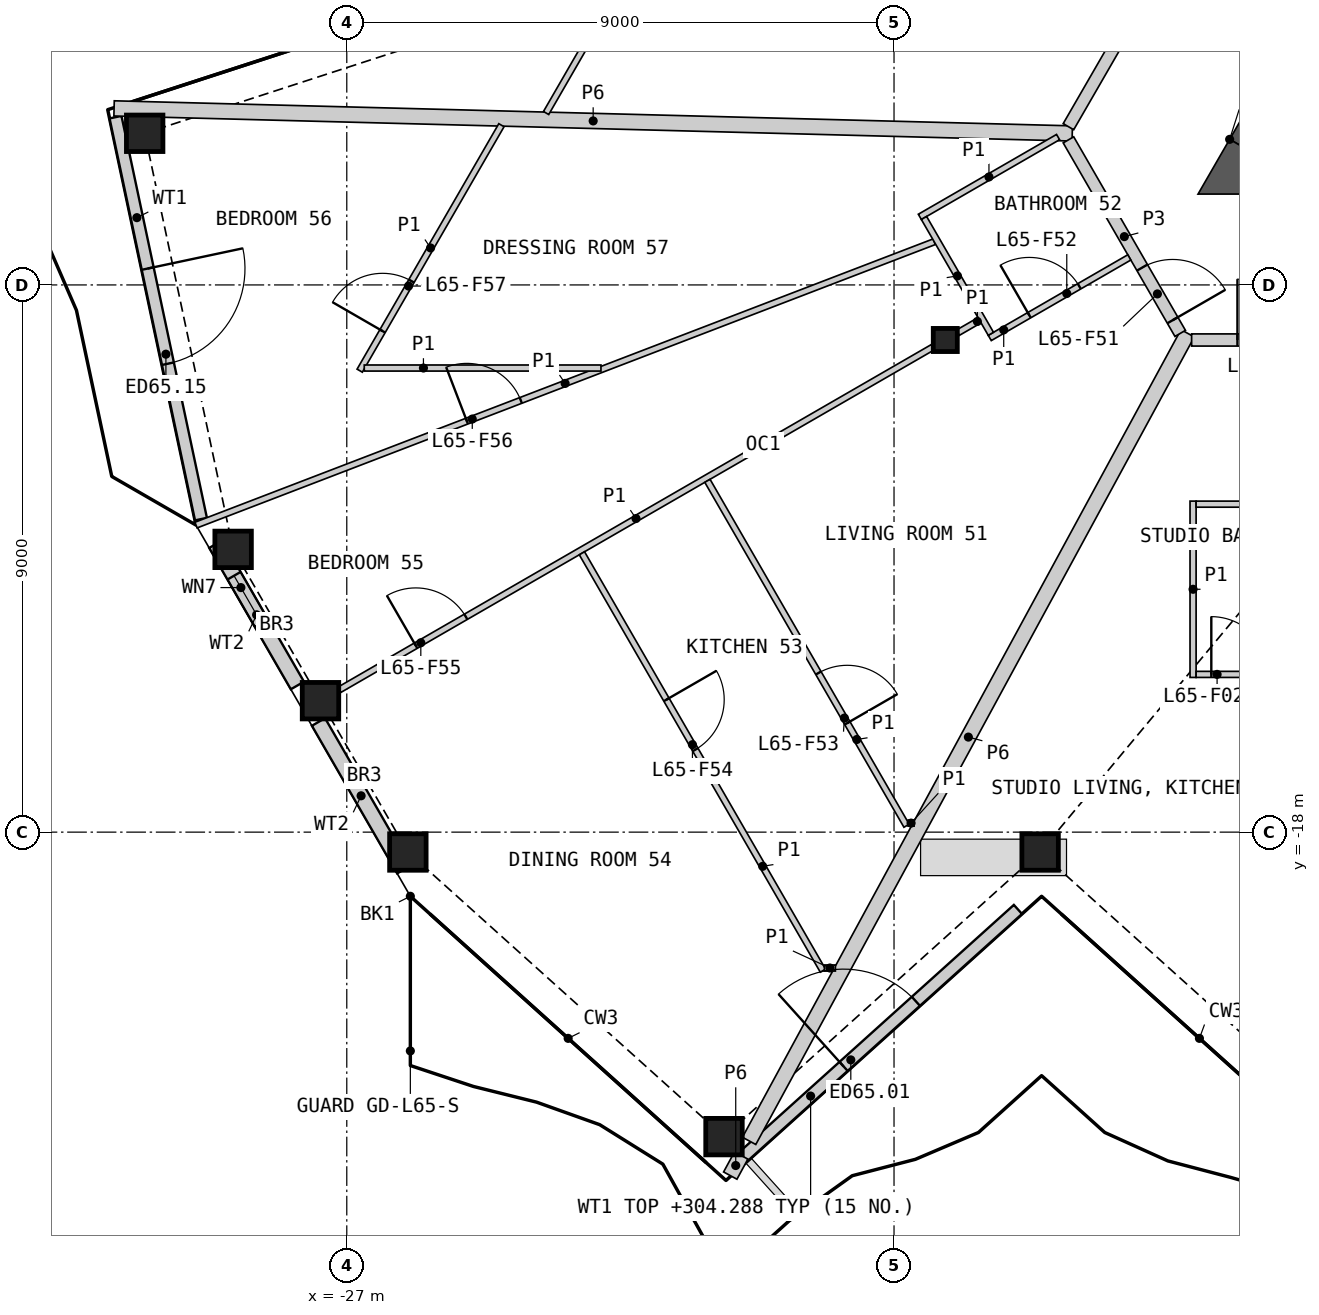
"""IFC4 building model, lengths in metres.
Left out: names, types, materials, properties, quantities, classifications, styles, units other than length and angle.
Written with IfcOpenShell. Run it as: python <this file> out.ifc"""

import sys

from ifc_helpers import new_model, si_unit, direction, frame, frame_2d, origin, origin_2d, place, context, subcontext, project, spatial, polyline, rectangle, hollow_rectangle, i_section, outline, extrude, element, fill, save


model = new_model("IFC4")
c1 = context("Model", 3, precision=1e-05, world=origin(), true_north=direction((0.0, 1.0)))
c2 = subcontext(c1, "Body", "Model", "MODEL_VIEW")
j1 = project(units=[si_unit("LENGTHUNIT", "METRE"), si_unit("PLANEANGLEUNIT", "RADIAN")], contexts=[c1])
p1 = place(None, origin())
s1 = spatial("IfcSite", under=j1, at=p1, CompositionType="ELEMENT")
p2 = place(p1, origin())
s2 = spatial("IfcBuilding", under=s1, at=p2, CompositionType="ELEMENT")
p3 = place(p2, frame((0.0, 0.0, 301.8)))
s3 = spatial("IfcBuildingStorey", under=s2, at=p3, CompositionType="ELEMENT", Elevation=301.8)
for number, where, z_axis, x_axis in (
    (1, (-25.995, -18.327, 0.0), (0.0, 0.0, 1.0), (1.0, 0.0, 0.0)),
    (2, (-20.796, -23.008, 0.0), (0.0, 0.0, 1.0), (1.0, 0.0, 0.0)),
    (3, (-15.597, -18.327, 0.0), (0.0, 0.0, 1.0), (1.0, 0.0, 0.0)),
    (4, (-30.324, -6.506, 0.0), (0.0, 0.0, 1.0), (1.0, 0.0, 0.0)),
    (5, (-28.869, -13.349, 0.0), (0.0, 0.0, 1.0), (1.0, 0.0, 0.0)),
    (6, (-27.432, -15.838, 0.0), (0.0, 0.0, 1.0), (1.0, 0.0, 0.0)),
):
    element("IfcColumn", number, at=place(p3, frame(where, z_axis=z_axis, x_axis=x_axis)), inside=s3, PredefinedType="COLUMN", context=c2, shape_type="SweptSolid", body=[
        extrude(hollow_rectangle(XDim=0.6, YDim=0.6, WallThickness=0.04, at=origin_2d()), origin(), (0.0, 0.0, 1.0), 3.4),
    ])
p4 = place(p3, frame((-17.157, -9.906, 0.0), z_axis=(0.0, 0.0, 1.0), x_axis=(1.0, 0.0, 0.0)))
e7 = element("IfcColumn", 7, at=p4, inside=s3, PredefinedType="COLUMN", context=c2, shape_type="SweptSolid", body=[
    extrude(i_section(OverallWidth=0.396, OverallDepth=0.381, WebThickness=0.019, FlangeThickness=0.03, at=origin_2d()), origin(), (0.0, 0.0, 1.0), 3.4),
])
p5 = place(p3, frame((-20.508, -23.364, 0.0), z_axis=(0.0, 0.0, 1.0), x_axis=(0.743135364919, 0.669141113224, 0.0)))
e8 = element("IfcWall", 8, at=p5, inside=s3, PredefinedType="SOLIDWALL", context=c2, shape_type="SweptSolid", body=[
    extrude(rectangle(XDim=6.117, YDim=0.2, at=frame_2d((3.059, 0.0))), origin(), (0.0, 0.0, 1.0), 2.488),
])
p6 = place(p5, frame((2.259, 0.0, 0.0)))
e9 = element("IfcOpeningElement", 9, at=p6, cuts=e8, PredefinedType="OPENING", context=c2, shape_type="SweptSolid", body=[
    extrude(rectangle(XDim=1.6, YDim=2.25, at=frame_2d((0.8, 1.125))), frame((0.0, 0.11, 0.0), z_axis=(0.0, -1.0, 0.0), x_axis=(1.0, 0.0, 0.0)), (0.0, 0.0, 1.0), 0.22),
])
p7 = place(p3, frame((-30.803, -6.241, 0.0), z_axis=(0.0, 0.0, 1.0), x_axis=(0.207917941651, -0.978146272057, 0.0)))
e10 = element("IfcWall", 10, at=p7, inside=s3, PredefinedType="SOLIDWALL", context=c2, shape_type="SweptSolid", body=[
    extrude(rectangle(XDim=6.759, YDim=0.2, at=frame_2d((3.379, 0.0))), origin(), (0.0, 0.0, 1.0), 2.488),
])
p8 = place(p7, frame((2.545, 0.0, 0.0)))
e11 = element("IfcOpeningElement", 11, at=p8, cuts=e10, PredefinedType="OPENING", context=c2, shape_type="SweptSolid", body=[
    extrude(rectangle(XDim=1.6, YDim=2.25, at=frame_2d((0.8, 1.125))), frame((0.0, 0.11, 0.0), z_axis=(0.0, -1.0, 0.0), x_axis=(1.0, 0.0, 0.0)), (0.0, 0.0, 1.0), 0.22),
])
p9 = place(p3, frame((-29.154, -13.263, 0.0), z_axis=(0.0, 0.0, 1.0), x_axis=(0.500032109083, -0.866006864803, 0.0)))
e12 = element("IfcWall", 12, at=p9, inside=s3, PredefinedType="SOLIDWALL", context=c2, shape_type="SweptSolid", body=[
    extrude(rectangle(XDim=2.684, YDim=0.25, at=frame_2d((1.342, 0.0))), origin(), (0.0, 0.0, 1.0), 2.488),
])
p10 = place(p9, frame((0.6, 0.0, 0.4)))
e13 = element("IfcOpeningElement", 13, at=p10, cuts=e12, PredefinedType="OPENING", context=c2, shape_type="SweptSolid", body=[
    extrude(rectangle(XDim=0.9, YDim=0.6, at=frame_2d((0.45, 0.3))), frame((0.0, 0.135, 0.0), z_axis=(0.0, -1.0, 0.0), x_axis=(1.0, 0.0, 0.0)), (0.0, 0.0, 1.0), 0.27),
])
p11 = place(p3, frame((-27.466, -16.188, 0.0), z_axis=(0.0, 0.0, 1.0), x_axis=(0.499968627931, -0.866043515699, 0.0)))
e14 = element("IfcWall", 14, at=p11, inside=s3, PredefinedType="SOLIDWALL", context=c2, shape_type="SweptSolid", body=[
    extrude(rectangle(XDim=2.804, YDim=0.25, at=frame_2d((1.402, 0.0))), origin(), (0.0, 0.0, 1.0), 2.488),
])
p12 = place(p3, frame((-9.562, -2.15, 0.0), z_axis=(0.0, 0.0, 1.0), x_axis=(-0.500015214976, -0.866016619236, 0.0)))
e15 = element("IfcWall", 15, at=p12, inside=s3, PredefinedType="SHEAR", context=c2, shape_type="SweptSolid", body=[
    extrude(rectangle(XDim=5.318, YDim=0.6, at=frame_2d((2.659, 0.0))), origin(), (0.0, 0.0, 1.0), 3.1),
])
p13 = place(p3, origin())
e16 = element("IfcWall", 16, at=p13, inside=s3, PredefinedType="SHEAR", context=c2, shape_type="SweptSolid", body=[
    extrude(outline(polyline([(-12.48, -6.606), (-11.961, -6.906), (-11.961, -7.506), (-13.0, -7.506), (-12.48, -6.606)])), origin(), (0.0, 0.0, 1.0), 3.1),
])
p14 = place(p3, frame((-30.827, -6.096, 0.0), z_axis=(0.0, 0.0, 1.0), x_axis=(0.999657799118, -0.026158835273, 0.0)))
e17 = element("IfcWall", 17, at=p14, inside=s3, PredefinedType="PARTITIONING", context=c2, shape_type="SweptSolid", body=[
    extrude(rectangle(XDim=15.763, YDim=0.25, at=frame_2d((7.882, 0.0))), origin(), (0.0, 0.0, 1.0), 2.33),
])
p15 = place(p3, frame((-20.383, -23.078, 0.0), z_axis=(0.0, 0.0, 1.0), x_axis=(0.477177412766, 0.878806984921, 0.0)))
e18 = element("IfcWall", 18, at=p15, inside=s3, PredefinedType="PARTITIONING", context=c2, shape_type="SweptSolid", body=[
    extrude(rectangle(XDim=15.114, YDim=0.25, at=frame_2d((7.557, 0.0))), origin(), (0.0, 0.0, 1.0), 2.33),
])
p16 = place(p3, frame((-13.106, -9.906, 0.0), z_axis=(0.0, 0.0, 1.0), x_axis=(1.0, 0.0, 0.0)))
e19 = element("IfcWall", 19, at=p16, inside=s3, PredefinedType="PARTITIONING", context=c2, shape_type="SweptSolid", body=[
    extrude(rectangle(XDim=4.32, YDim=0.2, at=frame_2d((2.16, 0.0))), origin(), (0.0, 0.0, 1.0), 3.1),
])
p17 = place(p16, frame((0.753, 0.0, 0.0)))
e20 = element("IfcOpeningElement", 20, at=p17, cuts=e19, PredefinedType="OPENING", context=c2, shape_type="SweptSolid", body=[
    extrude(rectangle(XDim=1.0, YDim=2.1, at=frame_2d((0.5, 1.05))), frame((0.0, 0.11, 0.0), z_axis=(0.0, -1.0, 0.0), x_axis=(1.0, 0.0, 0.0)), (0.0, 0.0, 1.0), 0.22),
])
p18 = place(p3, frame((-15.131, -6.397, 0.0), z_axis=(0.0, 0.0, 1.0), x_axis=(0.500003406062, 0.866023437285, 0.0)))
e21 = element("IfcWall", 21, at=p18, inside=s3, PredefinedType="PARTITIONING", context=c2, shape_type="SweptSolid", body=[
    extrude(rectangle(XDim=4.288, YDim=0.2, at=frame_2d((2.144, 0.0))), origin(), (0.0, 0.0, 1.0), 3.1),
])
p19 = place(p3, frame((-15.131, -6.614, 0.0), z_axis=(0.0, 0.0, 1.0), x_axis=(0.499967746641, -0.866044024469, 0.0)))
e22 = element("IfcWall", 22, at=p19, inside=s3, PredefinedType="PARTITIONING", context=c2, shape_type="SweptSolid", body=[
    extrude(rectangle(XDim=3.676, YDim=0.2, at=frame_2d((1.838, 0.0))), origin(), (0.0, 0.0, 1.0), 3.1),
])
p20 = place(p19, frame((2.426, 0.0, 0.0)))
e23 = element("IfcOpeningElement", 23, at=p20, cuts=e22, PredefinedType="OPENING", context=c2, shape_type="SweptSolid", body=[
    extrude(rectangle(XDim=1.0, YDim=2.1, at=frame_2d((0.5, 1.05))), frame((0.0, 0.11, 0.0), z_axis=(0.0, -1.0, 0.0), x_axis=(1.0, 0.0, 0.0)), (0.0, 0.0, 1.0), 0.22),
])
p21 = place(p3, frame((-20.693, -23.649, 0.0), z_axis=(0.0, 0.0, 1.0), x_axis=(0.477077538769, 0.878861207474, 0.0)))
e24 = element("IfcWall", 24, at=p21, inside=s3, PredefinedType="PARTITIONING", context=c2, shape_type="SweptSolid", body=[
    extrude(rectangle(XDim=0.376, YDim=0.25, at=frame_2d((0.188, 0.0))), origin(), (0.0, 0.0, 1.0), 2.33),
])
p22 = place(p3, frame((-29.479, -12.95, 0.0), z_axis=(0.0, 0.0, 1.0), x_axis=(0.933581523131, 0.358365092703, 0.0)))
e25 = element("IfcWall", 25, at=p22, inside=s3, PredefinedType="PARTITIONING", context=c2, shape_type="SweptSolid", body=[
    extrude(rectangle(XDim=13.005, YDim=0.1, at=frame_2d((6.502, 0.0))), origin(), (0.0, 0.0, 1.0), 2.33),
])
p23 = place(p22, frame((4.771, 0.0, 0.0)))
e26 = element("IfcOpeningElement", 26, at=p23, cuts=e25, PredefinedType="OPENING", context=c2, shape_type="SweptSolid", body=[
    extrude(rectangle(XDim=0.95, YDim=2.1, at=frame_2d((0.475, 1.05))), frame((0.0, 0.06, 0.0), z_axis=(0.0, -1.0, 0.0), x_axis=(1.0, 0.0, 0.0)), (0.0, 0.0, 1.0), 0.12),
])
p24 = place(p3, frame((-27.122, -15.659, 0.0), z_axis=(0.0, 0.0, 1.0), x_axis=(0.866021046153, 0.500007547564, 0.0)))
e27 = element("IfcWall", 27, at=p24, inside=s3, PredefinedType="PARTITIONING", context=c2, shape_type="SweptSolid", body=[
    extrude(rectangle(XDim=11.267, YDim=0.1, at=frame_2d((5.634, 0.0))), origin(), (0.0, 0.0, 1.0), 2.33),
])
p25 = place(p24, frame((1.452, 0.0, 0.0)))
e28 = element("IfcOpeningElement", 28, at=p25, cuts=e27, PredefinedType="OPENING", context=c2, shape_type="SweptSolid", body=[
    extrude(rectangle(XDim=0.95, YDim=2.1, at=frame_2d((0.475, 1.05))), frame((0.0, 0.06, 0.0), z_axis=(0.0, -1.0, 0.0), x_axis=(1.0, 0.0, 0.0)), (0.0, 0.0, 1.0), 0.12),
])
p26 = place(p3, frame((-23.133, -13.414, 0.0), z_axis=(0.0, 0.0, 1.0), x_axis=(0.500014841469, -0.866016834889, 0.0)))
e29 = element("IfcWall", 29, at=p26, inside=s3, PredefinedType="PARTITIONING", context=c2, shape_type="SweptSolid", body=[
    extrude(rectangle(XDim=7.927, YDim=0.1, at=frame_2d((3.963, 0.0))), origin(), (0.0, 0.0, 1.0), 2.33),
])
p27 = place(p26, frame((2.78, 0.0, 0.0)))
e30 = element("IfcOpeningElement", 30, at=p27, cuts=e29, PredefinedType="OPENING", context=c2, shape_type="SweptSolid", body=[
    extrude(rectangle(XDim=0.95, YDim=2.1, at=frame_2d((0.475, 1.05))), frame((0.0, 0.06, 0.0), z_axis=(0.0, -1.0, 0.0), x_axis=(1.0, 0.0, 0.0)), (0.0, 0.0, 1.0), 0.12),
])
p28 = place(p3, frame((-23.722, -6.172, 0.0), z_axis=(0.0, 0.0, 1.0), x_axis=(0.499991774685, 0.86603015262, 0.0)))
e31 = element("IfcWall", 31, at=p28, inside=s3, PredefinedType="PARTITIONING", context=c2, shape_type="SweptSolid", body=[
    extrude(rectangle(XDim=6.774, YDim=0.1, at=frame_2d((3.387, 0.0))), origin(), (0.0, 0.0, 1.0), 2.33),
])
p29 = place(p28, frame((3.364, 0.0, 0.0)))
e32 = element("IfcOpeningElement", 32, at=p29, cuts=e31, PredefinedType="OPENING", context=c2, shape_type="SweptSolid", body=[
    extrude(rectangle(XDim=0.95, YDim=2.1, at=frame_2d((0.475, 1.05))), frame((0.0, 0.06, 0.0), z_axis=(0.0, -1.0, 0.0), x_axis=(1.0, 0.0, 0.0)), (0.0, 0.0, 1.0), 0.12),
])
p30 = place(p3, frame((-21.069, -12.222, 0.0), z_axis=(0.0, 0.0, 1.0), x_axis=(0.499991310556, -0.866030420579, 0.0)))
e33 = element("IfcWall", 33, at=p30, inside=s3, PredefinedType="PARTITIONING", context=c2, shape_type="SweptSolid", body=[
    extrude(rectangle(XDim=6.55, YDim=0.1, at=frame_2d((3.275, 0.0))), origin(), (0.0, 0.0, 1.0), 2.33),
])
p31 = place(p30, frame((3.65, 0.0, 0.0)))
e34 = element("IfcOpeningElement", 34, at=p31, cuts=e33, PredefinedType="OPENING", context=c2, shape_type="SweptSolid", body=[
    extrude(rectangle(XDim=0.95, YDim=2.1, at=frame_2d((0.475, 1.05))), frame((0.0, 0.06, 0.0), z_axis=(0.0, -1.0, 0.0), x_axis=(1.0, 0.0, 0.0)), (0.0, 0.0, 1.0), 0.12),
])
p32 = place(p3, frame((-26.788, -10.41, 0.0), z_axis=(0.0, 0.0, 1.0), x_axis=(0.499997484116, 0.866026856326, 0.0)))
e35 = element("IfcWall", 35, at=p32, inside=s3, PredefinedType="PARTITIONING", context=c2, shape_type="SweptSolid", body=[
    extrude(rectangle(XDim=4.662, YDim=0.1, at=frame_2d((2.331, 0.0))), origin(), (0.0, 0.0, 1.0), 2.33),
])
p33 = place(p32, frame((0.752, 0.0, 0.0)))
e36 = element("IfcOpeningElement", 36, at=p33, cuts=e35, PredefinedType="OPENING", context=c2, shape_type="SweptSolid", body=[
    extrude(rectangle(XDim=0.95, YDim=2.1, at=frame_2d((0.475, 1.05))), frame((0.0, 0.06, 0.0), z_axis=(0.0, -1.0, 0.0), x_axis=(1.0, 0.0, 0.0)), (0.0, 0.0, 1.0), 0.12),
])
p34 = place(p3, frame((-26.712, -10.367, 0.0), z_axis=(0.0, 0.0, 1.0), x_axis=(1.0, 0.0, 0.0)))
e37 = element("IfcWall", 37, at=p34, inside=s3, PredefinedType="PARTITIONING", context=c2, shape_type="SweptSolid", body=[
    extrude(rectangle(XDim=3.893, YDim=0.1, at=frame_2d((1.946, 0.0))), origin(), (0.0, 0.0, 1.0), 2.33),
])
p35 = place(p3, frame((-13.082, -15.456, 0.0), z_axis=(0.0, 0.0, 1.0), x_axis=(0.0, 1.0, 0.0)))
e38 = element("IfcWall", 38, at=p35, inside=s3, PredefinedType="PARTITIONING", context=c2, shape_type="SweptSolid", body=[
    extrude(rectangle(XDim=2.9, YDim=0.1, at=frame_2d((1.45, 0.0))), origin(), (0.0, 0.0, 1.0), 2.33),
])
p36 = place(p3, frame((-16.426, -9.872, 0.0), z_axis=(0.0, 0.0, 1.0), x_axis=(0.866029095148, 0.499993606316, 0.0)))
e39 = element("IfcWall", 39, at=p36, inside=s3, PredefinedType="PARTITIONING", context=c2, shape_type="SweptSolid", body=[
    extrude(rectangle(XDim=2.65, YDim=0.1, at=frame_2d((1.325, 0.0))), origin(), (0.0, 0.0, 1.0), 2.33),
])
p37 = place(p36, frame((0.75, 0.0, 0.0)))
e40 = element("IfcOpeningElement", 40, at=p37, cuts=e39, PredefinedType="OPENING", context=c2, shape_type="SweptSolid", body=[
    extrude(rectangle(XDim=0.95, YDim=2.1, at=frame_2d((0.475, 1.05))), frame((0.0, 0.06, 0.0), z_axis=(0.0, -1.0, 0.0), x_axis=(1.0, 0.0, 0.0)), (0.0, 0.0, 1.0), 0.12),
])
p38 = place(p3, frame((-13.032, -12.606, 0.0), z_axis=(0.0, 0.0, 1.0), x_axis=(1.0, 0.0, 0.0)))
e41 = element("IfcWall", 41, at=p38, inside=s3, PredefinedType="PARTITIONING", context=c2, shape_type="SweptSolid", body=[
    extrude(rectangle(XDim=2.525, YDim=0.1, at=frame_2d((1.263, 0.0))), origin(), (0.0, 0.0, 1.0), 2.33),
])
p39 = place(p3, frame((-13.032, -15.406, 0.0), z_axis=(0.0, 0.0, 1.0), x_axis=(1.0, 0.0, 0.0)))
e42 = element("IfcWall", 42, at=p39, inside=s3, PredefinedType="PARTITIONING", context=c2, shape_type="SweptSolid", body=[
    extrude(rectangle(XDim=2.525, YDim=0.1, at=frame_2d((1.263, 0.0))), origin(), (0.0, 0.0, 1.0), 2.33),
])
p40 = place(p39, frame((0.25, 0.0, 0.0)))
e43 = element("IfcOpeningElement", 43, at=p40, cuts=e42, PredefinedType="OPENING", context=c2, shape_type="SweptSolid", body=[
    extrude(rectangle(XDim=0.95, YDim=2.1, at=frame_2d((0.475, 1.05))), frame((0.0, 0.06, 0.0), z_axis=(0.0, -1.0, 0.0), x_axis=(1.0, 0.0, 0.0)), (0.0, 0.0, 1.0), 0.12),
])
p41 = place(p3, frame((-17.575, -7.881, 0.0), z_axis=(0.0, 0.0, 1.0), x_axis=(0.866013657776, 0.500020344131, 0.0)))
e44 = element("IfcWall", 44, at=p41, inside=s3, PredefinedType="PARTITIONING", context=c2, shape_type="SweptSolid", body=[
    extrude(rectangle(XDim=2.625, YDim=0.1, at=frame_2d((1.312, 0.0))), origin(), (0.0, 0.0, 1.0), 2.33),
])
p42 = place(p3, frame((-17.507, -7.899, 0.0), z_axis=(0.0, 0.0, 1.0), x_axis=(0.499946605688, -0.86605622881, 0.0)))
e45 = element("IfcWall", 45, at=p42, inside=s3, PredefinedType="PARTITIONING", context=c2, shape_type="SweptSolid", body=[
    extrude(rectangle(XDim=2.2, YDim=0.1, at=frame_2d((1.1, 0.0))), origin(), (0.0, 0.0, 1.0), 2.33),
])
p43 = place(p3, frame((-16.949, -9.786, 0.0), z_axis=(0.0, 0.0, 1.0), x_axis=(0.866036909293, 0.499980071345, 0.0)))
e46 = element("IfcWall", 46, at=p43, inside=s3, PredefinedType="PARTITIONING", context=c2, shape_type="SweptSolid", body=[
    extrude(rectangle(XDim=0.41, YDim=0.1, at=frame_2d((0.205, 0.0))), origin(), (0.0, 0.0, 1.0), 2.33),
])
p44 = place(p3, frame((-19.145, -20.235, 0.0), z_axis=(0.0, 0.0, 1.0), x_axis=(1.0, 0.0, 0.0)))
e47 = element("IfcWall", 47, at=p44, inside=s3, PredefinedType="PARTITIONING", context=c2, shape_type="SweptSolid", body=[
    extrude(rectangle(XDim=0.18, YDim=0.1, at=frame_2d((0.09, 0.0))), origin(), (0.0, 0.0, 1.0), 2.33),
])
p45 = place(p3, frame((-17.769, -17.852, 0.0), z_axis=(0.0, 0.0, 1.0), x_axis=(1.0, 0.0, 0.0)))
e48 = element("IfcWall", 48, at=p45, inside=s3, PredefinedType="PARTITIONING", context=c2, shape_type="SweptSolid", body=[
    extrude(rectangle(XDim=0.098, YDim=0.1, at=frame_2d((0.049, 0.0))), origin(), (0.0, 0.0, 1.0), 2.33),
])
p46 = place(p6, origin())
e49 = element("IfcDoor", 49, at=p46, inside=s3, OperationType="DOUBLE_DOOR_SINGLE_SWING", PredefinedType="DOOR", context=c2, shape_type="SweptSolid", body=[
    extrude(rectangle(XDim=1.6, YDim=2.25, at=frame_2d((0.8, 1.125))), frame((0.0, 0.025, 0.0), z_axis=(0.0, -1.0, 0.0), x_axis=(1.0, 0.0, 0.0)), (0.0, 0.0, 1.0), 0.05),
])
fill(e9, e49)
p47 = place(p8, origin())
e50 = element("IfcDoor", 50, at=p47, inside=s3, OperationType="DOUBLE_DOOR_SINGLE_SWING", PredefinedType="DOOR", context=c2, shape_type="SweptSolid", body=[
    extrude(rectangle(XDim=1.6, YDim=2.25, at=frame_2d((0.8, 1.125))), frame((0.0, 0.025, 0.0), z_axis=(0.0, -1.0, 0.0), x_axis=(1.0, 0.0, 0.0)), (0.0, 0.0, 1.0), 0.05),
])
fill(e11, e50)
p48 = place(p10, origin())
e51 = element("IfcWindow", 51, at=p48, inside=s3, PartitioningType="SINGLE_PANEL", PredefinedType="WINDOW", context=c2, shape_type="SweptSolid", body=[
    extrude(rectangle(XDim=0.9, YDim=0.6, at=frame_2d((0.45, 0.3))), frame((0.0, 0.03, 0.0), z_axis=(0.0, -1.0, 0.0), x_axis=(1.0, 0.0, 0.0)), (0.0, 0.0, 1.0), 0.06),
])
fill(e13, e51)
p49 = place(p17, origin())
e52 = element("IfcDoor", 52, at=p49, inside=s3, OperationType="SINGLE_SWING_LEFT", PredefinedType="DOOR", context=c2, shape_type="SweptSolid", body=[
    extrude(rectangle(XDim=1.0, YDim=2.1, at=frame_2d((0.5, 1.05))), frame((0.0, 0.025, 0.0), z_axis=(0.0, -1.0, 0.0), x_axis=(1.0, 0.0, 0.0)), (0.0, 0.0, 1.0), 0.05),
])
fill(e20, e52)
p50 = place(p40, origin())
e53 = element("IfcDoor", 53, at=p50, inside=s3, OperationType="SINGLE_SWING_LEFT", PredefinedType="DOOR", context=c2, shape_type="SweptSolid", body=[
    extrude(rectangle(XDim=0.95, YDim=2.1, at=frame_2d((0.475, 1.05))), frame((0.0, 0.025, 0.0), z_axis=(0.0, -1.0, 0.0), x_axis=(1.0, 0.0, 0.0)), (0.0, 0.0, 1.0), 0.05),
])
fill(e43, e53)
p51 = place(p20, origin())
e54 = element("IfcDoor", 54, at=p51, inside=s3, OperationType="SINGLE_SWING_RIGHT", PredefinedType="DOOR", context=c2, shape_type="SweptSolid", body=[
    extrude(rectangle(XDim=1.0, YDim=2.1, at=frame_2d((0.5, 1.05))), frame((0.0, 0.025, 0.0), z_axis=(0.0, -1.0, 0.0), x_axis=(1.0, 0.0, 0.0)), (0.0, 0.0, 1.0), 0.05),
])
fill(e23, e54)
p52 = place(p37, origin())
e55 = element("IfcDoor", 55, at=p52, inside=s3, OperationType="SINGLE_SWING_LEFT", PredefinedType="DOOR", context=c2, shape_type="SweptSolid", body=[
    extrude(rectangle(XDim=0.95, YDim=2.1, at=frame_2d((0.475, 1.05))), frame((0.0, 0.025, 0.0), z_axis=(0.0, -1.0, 0.0), x_axis=(1.0, 0.0, 0.0)), (0.0, 0.0, 1.0), 0.05),
])
fill(e40, e55)
p53 = place(p31, origin())
e56 = element("IfcDoor", 56, at=p53, inside=s3, OperationType="SINGLE_SWING_RIGHT", PredefinedType="DOOR", context=c2, shape_type="SweptSolid", body=[
    extrude(rectangle(XDim=0.95, YDim=2.1, at=frame_2d((0.475, 1.05))), frame((0.0, 0.025, 0.0), z_axis=(0.0, -1.0, 0.0), x_axis=(1.0, 0.0, 0.0)), (0.0, 0.0, 1.0), 0.05),
])
fill(e34, e56)
p54 = place(p27, origin())
e57 = element("IfcDoor", 57, at=p54, inside=s3, OperationType="SINGLE_SWING_LEFT", PredefinedType="DOOR", context=c2, shape_type="SweptSolid", body=[
    extrude(rectangle(XDim=0.95, YDim=2.1, at=frame_2d((0.475, 1.05))), frame((0.0, 0.025, 0.0), z_axis=(0.0, -1.0, 0.0), x_axis=(1.0, 0.0, 0.0)), (0.0, 0.0, 1.0), 0.05),
])
fill(e30, e57)
p55 = place(p25, origin())
e58 = element("IfcDoor", 58, at=p55, inside=s3, OperationType="SINGLE_SWING_LEFT", PredefinedType="DOOR", context=c2, shape_type="SweptSolid", body=[
    extrude(rectangle(XDim=0.95, YDim=2.1, at=frame_2d((0.475, 1.05))), frame((0.0, 0.025, 0.0), z_axis=(0.0, -1.0, 0.0), x_axis=(1.0, 0.0, 0.0)), (0.0, 0.0, 1.0), 0.05),
])
fill(e28, e58)
p56 = place(p23, origin())
e59 = element("IfcDoor", 59, at=p56, inside=s3, OperationType="SINGLE_SWING_LEFT", PredefinedType="DOOR", context=c2, shape_type="SweptSolid", body=[
    extrude(rectangle(XDim=0.95, YDim=2.1, at=frame_2d((0.475, 1.05))), frame((0.0, 0.025, 0.0), z_axis=(0.0, -1.0, 0.0), x_axis=(1.0, 0.0, 0.0)), (0.0, 0.0, 1.0), 0.05),
])
fill(e26, e59)
p57 = place(p33, origin())
e60 = element("IfcDoor", 60, at=p57, inside=s3, OperationType="SINGLE_SWING_LEFT", PredefinedType="DOOR", context=c2, shape_type="SweptSolid", body=[
    extrude(rectangle(XDim=0.95, YDim=2.1, at=frame_2d((0.475, 1.05))), frame((0.0, 0.025, 0.0), z_axis=(0.0, -1.0, 0.0), x_axis=(1.0, 0.0, 0.0)), (0.0, 0.0, 1.0), 0.05),
])
fill(e36, e60)
save(model, sys.argv[1])
